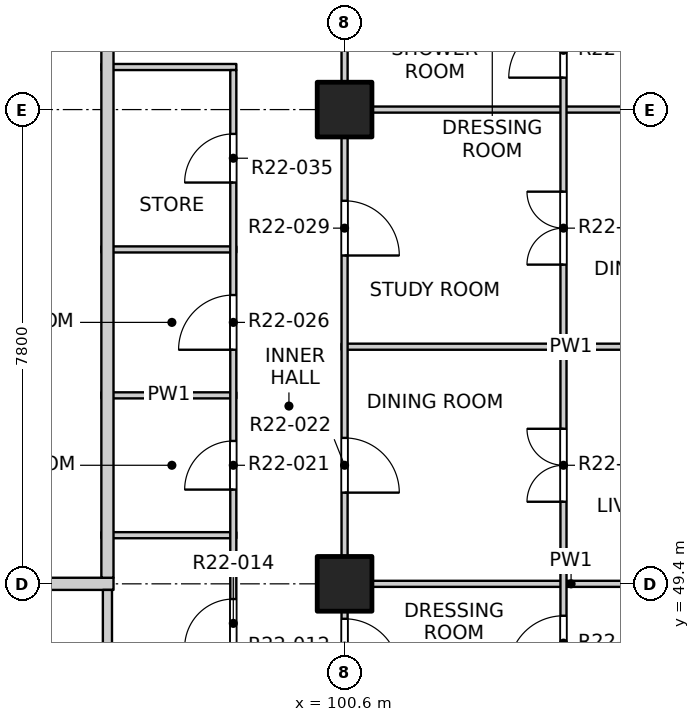
"""IFC4 building model, lengths in metres.
Left out: names, types, materials, properties, quantities, classifications, styles, units other than length and angle.
Written with IfcOpenShell. Run it as: python <this file> out.ifc"""

import sys

from ifc_helpers import new_model, si_unit, direction, frame, frame_2d, origin, origin_2d, place, context, subcontext, project, spatial, rectangle, extrude, element, fill, save


model = new_model("IFC4")
c1 = context("Model", 3, precision=1e-05, world=origin(), true_north=direction((0.0, 1.0)))
c2 = subcontext(c1, "Body", "Model", "MODEL_VIEW")
j1 = project(units=[si_unit("LENGTHUNIT", "METRE"), si_unit("PLANEANGLEUNIT", "RADIAN")], contexts=[c1])
p1 = place(None, origin())
s1 = spatial("IfcSite", under=j1, at=p1, CompositionType="ELEMENT")
p2 = place(p1, origin())
s2 = spatial("IfcBuilding", under=s1, at=p2, CompositionType="ELEMENT")
p3 = place(p2, frame((0.0, 0.0, 231.3)))
s3 = spatial("IfcBuildingStorey", under=s2, at=p3, CompositionType="ELEMENT", Elevation=231.3)
for number, where, z_axis, x_axis in (
    (1, (100.6, 49.4, -0.25), (0.0, 0.0, 1.0), (1.0, 0.0, 0.0)),
    (2, (100.6, 57.2, -0.25), (0.0, 0.0, 1.0), (1.0, 0.0, 0.0)),
):
    element("IfcColumn", number, at=place(p3, frame(where, z_axis=z_axis, x_axis=x_axis)), inside=s3, PredefinedType="COLUMN", context=c2, shape_type="SweptSolid", body=[
        extrude(rectangle(XDim=0.9, YDim=0.9, at=origin_2d()), origin(), (0.0, 0.0, 1.0), 3.4),
    ])
p4 = place(p3, frame((73.2, 49.4, 0.0), z_axis=(0.0, 0.0, 1.0), x_axis=(1.0, 0.0, 0.0)))
e3 = element("IfcWall", 3, at=p4, inside=s3, PredefinedType="PARTITIONING", context=c2, shape_type="SweptSolid", body=[
    extrude(rectangle(XDim=23.6, YDim=0.2, at=frame_2d((11.8, 0.0))), origin(), (0.0, 0.0, 1.0), 3.15),
])
p5 = place(p4, frame((5.35, 0.0, 0.0)))
e4 = element("IfcOpeningElement", 4, at=p5, cuts=e3, PredefinedType="OPENING", context=c2, shape_type="SweptSolid", body=[
    extrude(rectangle(XDim=1.2, YDim=2.1, at=frame_2d((0.6, 1.05))), frame((0.0, 0.11, 0.0), z_axis=(0.0, -1.0, 0.0), x_axis=(1.0, 0.0, 0.0)), (0.0, 0.0, 1.0), 0.22),
])
p6 = place(p4, frame((15.1, 0.0, 0.0)))
e5 = element("IfcOpeningElement", 5, at=p6, cuts=e3, PredefinedType="OPENING", context=c2, shape_type="SweptSolid", body=[
    extrude(rectangle(XDim=1.2, YDim=2.1, at=frame_2d((0.6, 1.05))), frame((0.0, 0.11, 0.0), z_axis=(0.0, -1.0, 0.0), x_axis=(1.0, 0.0, 0.0)), (0.0, 0.0, 1.0), 0.22),
])
p7 = place(p4, frame((21.1, 0.0, 0.0)))
e6 = element("IfcOpeningElement", 6, at=p7, cuts=e3, PredefinedType="OPENING", context=c2, shape_type="SweptSolid", body=[
    extrude(rectangle(XDim=0.9, YDim=2.1, at=frame_2d((0.45, 1.05))), frame((0.0, 0.11, 0.0), z_axis=(0.0, -1.0, 0.0), x_axis=(1.0, 0.0, 0.0)), (0.0, 0.0, 1.0), 0.22),
])
p8 = place(p3, frame((100.55, 49.4, 0.0), z_axis=(0.0, 0.0, 1.0), x_axis=(1.0, 0.0, 0.0)))
e7 = element("IfcWall", 7, at=p8, inside=s3, PredefinedType="PARTITIONING", context=c2, shape_type="SweptSolid", body=[
    extrude(rectangle(XDim=7.55, YDim=0.1, at=frame_2d((3.775, 0.0))), origin(), (0.0, 0.0, 1.0), 3.15),
])
for number, where, z_axis, x_axis in (
    (8, (96.6, 50.2, 0.0), (0.0, 0.0, 1.0), (1.0, 0.0, 0.0)),
    (9, (96.6, 52.5, 0.0), (0.0, 0.0, 1.0), (1.0, 0.0, 0.0)),
):
    element("IfcWall", number, at=place(p3, frame(where, z_axis=z_axis, x_axis=x_axis)), inside=s3, PredefinedType="PARTITIONING", context=c2, shape_type="SweptSolid", body=[
        extrude(rectangle(XDim=2.22, YDim=0.1, at=frame_2d((1.11, 0.0))), origin(), (0.0, 0.0, 1.0), 3.15),
    ])
p9 = place(p3, frame((100.55, 53.3, 0.0), z_axis=(0.0, 0.0, 1.0), x_axis=(1.0, 0.0, 0.0)))
e10 = element("IfcWall", 10, at=p9, inside=s3, PredefinedType="PARTITIONING", context=c2, shape_type="SweptSolid", body=[
    extrude(rectangle(XDim=7.55, YDim=0.1, at=frame_2d((3.775, 0.0))), origin(), (0.0, 0.0, 1.0), 3.15),
])
p10 = place(p3, frame((96.6, 54.9, 0.0), z_axis=(0.0, 0.0, 1.0), x_axis=(1.0, 0.0, 0.0)))
e11 = element("IfcWall", 11, at=p10, inside=s3, PredefinedType="PARTITIONING", context=c2, shape_type="SweptSolid", body=[
    extrude(rectangle(XDim=2.22, YDim=0.1, at=frame_2d((1.11, 0.0))), origin(), (0.0, 0.0, 1.0), 3.15),
])
p11 = place(p3, frame((100.55, 57.2, 0.0), z_axis=(0.0, 0.0, 1.0), x_axis=(1.0, 0.0, 0.0)))
e12 = element("IfcWall", 12, at=p11, inside=s3, PredefinedType="PARTITIONING", context=c2, shape_type="SweptSolid", body=[
    extrude(rectangle(XDim=7.55, YDim=0.1, at=frame_2d((3.775, 0.0))), origin(), (0.0, 0.0, 1.0), 3.15),
])
p12 = place(p3, frame((96.6, 57.9, 0.0), z_axis=(0.0, 0.0, 1.0), x_axis=(1.0, 0.0, 0.0)))
e13 = element("IfcWall", 13, at=p12, inside=s3, PredefinedType="PARTITIONING", context=c2, shape_type="SweptSolid", body=[
    extrude(rectangle(XDim=2.22, YDim=0.1, at=frame_2d((1.11, 0.0))), origin(), (0.0, 0.0, 1.0), 3.15),
])
p13 = place(p3, frame((96.7, 41.9, 0.0), z_axis=(0.0, 0.0, 1.0), x_axis=(0.0, 1.0, 0.0)))
e14 = element("IfcWall", 14, at=p13, inside=s3, PredefinedType="PARTITIONING", context=c2, shape_type="SweptSolid", body=[
    extrude(rectangle(XDim=7.4, YDim=0.15, at=frame_2d((3.7, 0.0))), origin(), (0.0, 0.0, 1.0), 3.15),
])
p14 = place(p3, frame((96.7, 49.5, 0.0), z_axis=(0.0, 0.0, 1.0), x_axis=(0.0, 1.0, 0.0)))
e15 = element("IfcWall", 15, at=p14, inside=s3, PredefinedType="PARTITIONING", context=c2, shape_type="SweptSolid", body=[
    extrude(rectangle(XDim=34.9, YDim=0.2, at=frame_2d((17.45, 0.0))), origin(), (0.0, 0.0, 1.0), 3.15),
])
p15 = place(p14, frame((9.675, 0.0, 0.0)))
e16 = element("IfcOpeningElement", 16, at=p15, cuts=e15, PredefinedType="OPENING", context=c2, shape_type="SweptSolid", body=[
    extrude(rectangle(XDim=1.0, YDim=2.1, at=frame_2d((0.5, 1.05))), frame((0.0, 0.11, 0.0), z_axis=(0.0, -1.0, 0.0), x_axis=(1.0, 0.0, 0.0)), (0.0, 0.0, 1.0), 0.22),
])
p16 = place(p14, frame((22.925, 0.0, 0.0)))
e17 = element("IfcOpeningElement", 17, at=p16, cuts=e15, PredefinedType="OPENING", context=c2, shape_type="SweptSolid", body=[
    extrude(rectangle(XDim=1.0, YDim=2.1, at=frame_2d((0.5, 1.05))), frame((0.0, 0.11, 0.0), z_axis=(0.0, -1.0, 0.0), x_axis=(1.0, 0.0, 0.0)), (0.0, 0.0, 1.0), 0.22),
])
p17 = place(p14, frame((33.025, 0.0, 0.0)))
e18 = element("IfcOpeningElement", 18, at=p17, cuts=e15, PredefinedType="OPENING", context=c2, shape_type="SweptSolid", body=[
    extrude(rectangle(XDim=1.0, YDim=2.1, at=frame_2d((0.5, 1.05))), frame((0.0, 0.11, 0.0), z_axis=(0.0, -1.0, 0.0), x_axis=(1.0, 0.0, 0.0)), (0.0, 0.0, 1.0), 0.22),
])
p18 = place(p3, frame((98.77, 45.55, 0.0), z_axis=(0.0, 0.0, 1.0), x_axis=(0.0, 1.0, 0.0)))
e19 = element("IfcWall", 19, at=p18, inside=s3, PredefinedType="PARTITIONING", context=c2, shape_type="SweptSolid", body=[
    extrude(rectangle(XDim=12.3, YDim=0.1, at=frame_2d((6.15, 0.0))), origin(), (0.0, 0.0, 1.0), 3.15),
])
p19 = place(p18, frame((0.4, 0.0, 0.0)))
e20 = element("IfcOpeningElement", 20, at=p19, cuts=e19, PredefinedType="OPENING", context=c2, shape_type="SweptSolid", body=[
    extrude(rectangle(XDim=0.9, YDim=2.1, at=frame_2d((0.45, 1.05))), frame((0.0, 0.06, 0.0), z_axis=(0.0, -1.0, 0.0), x_axis=(1.0, 0.0, 0.0)), (0.0, 0.0, 1.0), 0.12),
])
p20 = place(p18, frame((2.8, 0.0, 0.0)))
e21 = element("IfcOpeningElement", 21, at=p20, cuts=e19, PredefinedType="OPENING", context=c2, shape_type="SweptSolid", body=[
    extrude(rectangle(XDim=0.8, YDim=2.1, at=frame_2d((0.4, 1.05))), frame((0.0, 0.06, 0.0), z_axis=(0.0, -1.0, 0.0), x_axis=(1.0, 0.0, 0.0)), (0.0, 0.0, 1.0), 0.12),
])
p21 = place(p18, frame((5.4, 0.0, 0.0)))
e22 = element("IfcOpeningElement", 22, at=p21, cuts=e19, PredefinedType="OPENING", context=c2, shape_type="SweptSolid", body=[
    extrude(rectangle(XDim=0.8, YDim=2.1, at=frame_2d((0.4, 1.05))), frame((0.0, 0.06, 0.0), z_axis=(0.0, -1.0, 0.0), x_axis=(1.0, 0.0, 0.0)), (0.0, 0.0, 1.0), 0.12),
])
p22 = place(p18, frame((7.7, 0.0, 0.0)))
e23 = element("IfcOpeningElement", 23, at=p22, cuts=e19, PredefinedType="OPENING", context=c2, shape_type="SweptSolid", body=[
    extrude(rectangle(XDim=0.9, YDim=2.1, at=frame_2d((0.45, 1.05))), frame((0.0, 0.06, 0.0), z_axis=(0.0, -1.0, 0.0), x_axis=(1.0, 0.0, 0.0)), (0.0, 0.0, 1.0), 0.12),
])
p23 = place(p18, frame((10.45, 0.0, 0.0)))
e24 = element("IfcOpeningElement", 24, at=p23, cuts=e19, PredefinedType="OPENING", context=c2, shape_type="SweptSolid", body=[
    extrude(rectangle(XDim=0.8, YDim=2.1, at=frame_2d((0.4, 1.05))), frame((0.0, 0.06, 0.0), z_axis=(0.0, -1.0, 0.0), x_axis=(1.0, 0.0, 0.0)), (0.0, 0.0, 1.0), 0.12),
])
p24 = place(p3, frame((100.6, 41.9, 0.0), z_axis=(0.0, 0.0, 1.0), x_axis=(0.0, 1.0, 0.0)))
e25 = element("IfcWall", 25, at=p24, inside=s3, PredefinedType="PARTITIONING", context=c2, shape_type="SweptSolid", body=[
    extrude(rectangle(XDim=46.2, YDim=0.1, at=frame_2d((23.1, 0.0))), origin(), (0.0, 0.0, 1.0), 3.15),
])
p25 = place(p24, frame((1.2, 0.0, 0.0)))
e26 = element("IfcOpeningElement", 26, at=p25, cuts=e25, PredefinedType="OPENING", context=c2, shape_type="SweptSolid", body=[
    extrude(rectangle(XDim=0.9, YDim=2.1, at=frame_2d((0.45, 1.05))), frame((0.0, 0.06, 0.0), z_axis=(0.0, -1.0, 0.0), x_axis=(1.0, 0.0, 0.0)), (0.0, 0.0, 1.0), 0.12),
])
p26 = place(p24, frame((6.025, 0.0, 0.0)))
e27 = element("IfcOpeningElement", 27, at=p26, cuts=e25, PredefinedType="OPENING", context=c2, shape_type="SweptSolid", body=[
    extrude(rectangle(XDim=0.9, YDim=2.1, at=frame_2d((0.45, 1.05))), frame((0.0, 0.06, 0.0), z_axis=(0.0, -1.0, 0.0), x_axis=(1.0, 0.0, 0.0)), (0.0, 0.0, 1.0), 0.12),
])
p27 = place(p24, frame((9.0, 0.0, 0.0)))
e28 = element("IfcOpeningElement", 28, at=p27, cuts=e25, PredefinedType="OPENING", context=c2, shape_type="SweptSolid", body=[
    extrude(rectangle(XDim=0.9, YDim=2.1, at=frame_2d((0.45, 1.05))), frame((0.0, 0.06, 0.0), z_axis=(0.0, -1.0, 0.0), x_axis=(1.0, 0.0, 0.0)), (0.0, 0.0, 1.0), 0.12),
])
p28 = place(p24, frame((12.9, 0.0, 0.0)))
e29 = element("IfcOpeningElement", 29, at=p28, cuts=e25, PredefinedType="OPENING", context=c2, shape_type="SweptSolid", body=[
    extrude(rectangle(XDim=0.9, YDim=2.1, at=frame_2d((0.45, 1.05))), frame((0.0, 0.06, 0.0), z_axis=(0.0, -1.0, 0.0), x_axis=(1.0, 0.0, 0.0)), (0.0, 0.0, 1.0), 0.12),
])
p29 = place(p24, frame((17.775, 0.0, 0.0)))
e30 = element("IfcOpeningElement", 30, at=p29, cuts=e25, PredefinedType="OPENING", context=c2, shape_type="SweptSolid", body=[
    extrude(rectangle(XDim=0.9, YDim=2.1, at=frame_2d((0.45, 1.05))), frame((0.0, 0.06, 0.0), z_axis=(0.0, -1.0, 0.0), x_axis=(1.0, 0.0, 0.0)), (0.0, 0.0, 1.0), 0.12),
])
p30 = place(p24, frame((21.625, 0.0, 0.0)))
e31 = element("IfcOpeningElement", 31, at=p30, cuts=e25, PredefinedType="OPENING", context=c2, shape_type="SweptSolid", body=[
    extrude(rectangle(XDim=0.9, YDim=2.1, at=frame_2d((0.45, 1.05))), frame((0.0, 0.06, 0.0), z_axis=(0.0, -1.0, 0.0), x_axis=(1.0, 0.0, 0.0)), (0.0, 0.0, 1.0), 0.12),
])
p31 = place(p24, frame((25.575, 0.0, 0.0)))
e32 = element("IfcOpeningElement", 32, at=p31, cuts=e25, PredefinedType="OPENING", context=c2, shape_type="SweptSolid", body=[
    extrude(rectangle(XDim=0.9, YDim=2.1, at=frame_2d((0.45, 1.05))), frame((0.0, 0.06, 0.0), z_axis=(0.0, -1.0, 0.0), x_axis=(1.0, 0.0, 0.0)), (0.0, 0.0, 1.0), 0.12),
])
p32 = place(p24, frame((28.5, 0.0, 0.0)))
e33 = element("IfcOpeningElement", 33, at=p32, cuts=e25, PredefinedType="OPENING", context=c2, shape_type="SweptSolid", body=[
    extrude(rectangle(XDim=0.9, YDim=2.1, at=frame_2d((0.45, 1.05))), frame((0.0, 0.06, 0.0), z_axis=(0.0, -1.0, 0.0), x_axis=(1.0, 0.0, 0.0)), (0.0, 0.0, 1.0), 0.12),
])
p33 = place(p24, frame((33.375, 0.0, 0.0)))
e34 = element("IfcOpeningElement", 34, at=p33, cuts=e25, PredefinedType="OPENING", context=c2, shape_type="SweptSolid", body=[
    extrude(rectangle(XDim=0.9, YDim=2.1, at=frame_2d((0.45, 1.05))), frame((0.0, 0.06, 0.0), z_axis=(0.0, -1.0, 0.0), x_axis=(1.0, 0.0, 0.0)), (0.0, 0.0, 1.0), 0.12),
])
p34 = place(p24, frame((36.3, 0.0, 0.0)))
e35 = element("IfcOpeningElement", 35, at=p34, cuts=e25, PredefinedType="OPENING", context=c2, shape_type="SweptSolid", body=[
    extrude(rectangle(XDim=0.9, YDim=2.1, at=frame_2d((0.45, 1.05))), frame((0.0, 0.06, 0.0), z_axis=(0.0, -1.0, 0.0), x_axis=(1.0, 0.0, 0.0)), (0.0, 0.0, 1.0), 0.12),
])
p35 = place(p24, frame((40.2, 0.0, 0.0)))
e36 = element("IfcOpeningElement", 36, at=p35, cuts=e25, PredefinedType="OPENING", context=c2, shape_type="SweptSolid", body=[
    extrude(rectangle(XDim=0.9, YDim=2.1, at=frame_2d((0.45, 1.05))), frame((0.0, 0.06, 0.0), z_axis=(0.0, -1.0, 0.0), x_axis=(1.0, 0.0, 0.0)), (0.0, 0.0, 1.0), 0.12),
])
p36 = place(p24, frame((44.1, 0.0, 0.0)))
e37 = element("IfcOpeningElement", 37, at=p36, cuts=e25, PredefinedType="OPENING", context=c2, shape_type="SweptSolid", body=[
    extrude(rectangle(XDim=0.9, YDim=2.1, at=frame_2d((0.45, 1.05))), frame((0.0, 0.06, 0.0), z_axis=(0.0, -1.0, 0.0), x_axis=(1.0, 0.0, 0.0)), (0.0, 0.0, 1.0), 0.12),
])
p37 = place(p3, frame((104.2, 41.9, 0.0), z_axis=(0.0, 0.0, 1.0), x_axis=(0.0, 1.0, 0.0)))
e38 = element("IfcWall", 38, at=p37, inside=s3, PredefinedType="PARTITIONING", context=c2, shape_type="SweptSolid", body=[
    extrude(rectangle(XDim=34.7, YDim=0.1, at=frame_2d((17.35, 0.0))), origin(), (0.0, 0.0, 1.0), 3.15),
])
p38 = place(p37, frame((1.05, 0.0, 0.0)))
e39 = element("IfcOpeningElement", 39, at=p38, cuts=e38, PredefinedType="OPENING", context=c2, shape_type="SweptSolid", body=[
    extrude(rectangle(XDim=1.2, YDim=2.1, at=frame_2d((0.6, 1.05))), frame((0.0, 0.06, 0.0), z_axis=(0.0, -1.0, 0.0), x_axis=(1.0, 0.0, 0.0)), (0.0, 0.0, 1.0), 0.12),
])
p39 = place(p37, frame((4.125, 0.0, 0.0)))
e40 = element("IfcOpeningElement", 40, at=p39, cuts=e38, PredefinedType="OPENING", context=c2, shape_type="SweptSolid", body=[
    extrude(rectangle(XDim=0.9, YDim=2.1, at=frame_2d((0.45, 1.05))), frame((0.0, 0.06, 0.0), z_axis=(0.0, -1.0, 0.0), x_axis=(1.0, 0.0, 0.0)), (0.0, 0.0, 1.0), 0.12),
])
p40 = place(p37, frame((6.075, 0.0, 0.0)))
e41 = element("IfcOpeningElement", 41, at=p40, cuts=e38, PredefinedType="OPENING", context=c2, shape_type="SweptSolid", body=[
    extrude(rectangle(XDim=0.9, YDim=2.1, at=frame_2d((0.45, 1.05))), frame((0.0, 0.06, 0.0), z_axis=(0.0, -1.0, 0.0), x_axis=(1.0, 0.0, 0.0)), (0.0, 0.0, 1.0), 0.12),
])
p41 = place(p37, frame((8.85, 0.0, 0.0)))
e42 = element("IfcOpeningElement", 42, at=p41, cuts=e38, PredefinedType="OPENING", context=c2, shape_type="SweptSolid", body=[
    extrude(rectangle(XDim=1.2, YDim=2.1, at=frame_2d((0.6, 1.05))), frame((0.0, 0.06, 0.0), z_axis=(0.0, -1.0, 0.0), x_axis=(1.0, 0.0, 0.0)), (0.0, 0.0, 1.0), 0.12),
])
p42 = place(p37, frame((12.75, 0.0, 0.0)))
e43 = element("IfcOpeningElement", 43, at=p42, cuts=e38, PredefinedType="OPENING", context=c2, shape_type="SweptSolid", body=[
    extrude(rectangle(XDim=1.2, YDim=2.1, at=frame_2d((0.6, 1.05))), frame((0.0, 0.06, 0.0), z_axis=(0.0, -1.0, 0.0), x_axis=(1.0, 0.0, 0.0)), (0.0, 0.0, 1.0), 0.12),
])
p43 = place(p37, frame((15.825, 0.0, 0.0)))
e44 = element("IfcOpeningElement", 44, at=p43, cuts=e38, PredefinedType="OPENING", context=c2, shape_type="SweptSolid", body=[
    extrude(rectangle(XDim=0.9, YDim=2.1, at=frame_2d((0.45, 1.05))), frame((0.0, 0.06, 0.0), z_axis=(0.0, -1.0, 0.0), x_axis=(1.0, 0.0, 0.0)), (0.0, 0.0, 1.0), 0.12),
])
p44 = place(p37, frame((17.775, 0.0, 0.0)))
e45 = element("IfcOpeningElement", 45, at=p44, cuts=e38, PredefinedType="OPENING", context=c2, shape_type="SweptSolid", body=[
    extrude(rectangle(XDim=0.9, YDim=2.1, at=frame_2d((0.45, 1.05))), frame((0.0, 0.06, 0.0), z_axis=(0.0, -1.0, 0.0), x_axis=(1.0, 0.0, 0.0)), (0.0, 0.0, 1.0), 0.12),
])
p45 = place(p37, frame((19.725, 0.0, 0.0)))
e46 = element("IfcOpeningElement", 46, at=p45, cuts=e38, PredefinedType="OPENING", context=c2, shape_type="SweptSolid", body=[
    extrude(rectangle(XDim=0.9, YDim=2.1, at=frame_2d((0.45, 1.05))), frame((0.0, 0.06, 0.0), z_axis=(0.0, -1.0, 0.0), x_axis=(1.0, 0.0, 0.0)), (0.0, 0.0, 1.0), 0.12),
])
p46 = place(p37, frame((21.675, 0.0, 0.0)))
e47 = element("IfcOpeningElement", 47, at=p46, cuts=e38, PredefinedType="OPENING", context=c2, shape_type="SweptSolid", body=[
    extrude(rectangle(XDim=0.9, YDim=2.1, at=frame_2d((0.45, 1.05))), frame((0.0, 0.06, 0.0), z_axis=(0.0, -1.0, 0.0), x_axis=(1.0, 0.0, 0.0)), (0.0, 0.0, 1.0), 0.12),
])
p47 = place(p37, frame((23.625, 0.0, 0.0)))
e48 = element("IfcOpeningElement", 48, at=p47, cuts=e38, PredefinedType="OPENING", context=c2, shape_type="SweptSolid", body=[
    extrude(rectangle(XDim=0.9, YDim=2.1, at=frame_2d((0.45, 1.05))), frame((0.0, 0.06, 0.0), z_axis=(0.0, -1.0, 0.0), x_axis=(1.0, 0.0, 0.0)), (0.0, 0.0, 1.0), 0.12),
])
p48 = place(p37, frame((25.575, 0.0, 0.0)))
e49 = element("IfcOpeningElement", 49, at=p48, cuts=e38, PredefinedType="OPENING", context=c2, shape_type="SweptSolid", body=[
    extrude(rectangle(XDim=0.9, YDim=2.1, at=frame_2d((0.45, 1.05))), frame((0.0, 0.06, 0.0), z_axis=(0.0, -1.0, 0.0), x_axis=(1.0, 0.0, 0.0)), (0.0, 0.0, 1.0), 0.12),
])
p49 = place(p37, frame((28.35, 0.0, 0.0)))
e50 = element("IfcOpeningElement", 50, at=p49, cuts=e38, PredefinedType="OPENING", context=c2, shape_type="SweptSolid", body=[
    extrude(rectangle(XDim=1.2, YDim=2.1, at=frame_2d((0.6, 1.05))), frame((0.0, 0.06, 0.0), z_axis=(0.0, -1.0, 0.0), x_axis=(1.0, 0.0, 0.0)), (0.0, 0.0, 1.0), 0.12),
])
p50 = place(p37, frame((31.425, 0.0, 0.0)))
e51 = element("IfcOpeningElement", 51, at=p50, cuts=e38, PredefinedType="OPENING", context=c2, shape_type="SweptSolid", body=[
    extrude(rectangle(XDim=0.9, YDim=2.1, at=frame_2d((0.45, 1.05))), frame((0.0, 0.06, 0.0), z_axis=(0.0, -1.0, 0.0), x_axis=(1.0, 0.0, 0.0)), (0.0, 0.0, 1.0), 0.12),
])
p51 = place(p37, frame((33.375, 0.0, 0.0)))
e52 = element("IfcOpeningElement", 52, at=p51, cuts=e38, PredefinedType="OPENING", context=c2, shape_type="SweptSolid", body=[
    extrude(rectangle(XDim=0.9, YDim=2.1, at=frame_2d((0.45, 1.05))), frame((0.0, 0.06, 0.0), z_axis=(0.0, -1.0, 0.0), x_axis=(1.0, 0.0, 0.0)), (0.0, 0.0, 1.0), 0.12),
])
p52 = place(p26, origin())
e53 = element("IfcDoor", 53, at=p52, inside=s3, OperationType="SINGLE_SWING_RIGHT", PredefinedType="DOOR", context=c2, shape_type="SweptSolid", body=[
    extrude(rectangle(XDim=0.9, YDim=2.1, at=frame_2d((0.45, 1.05))), frame((0.0, 0.025, 0.0), z_axis=(0.0, -1.0, 0.0), x_axis=(1.0, 0.0, 0.0)), (0.0, 0.0, 1.0), 0.05),
])
fill(e27, e53)
p53 = place(p40, origin())
e54 = element("IfcDoor", 54, at=p53, inside=s3, OperationType="SINGLE_SWING_LEFT", PredefinedType="DOOR", context=c2, shape_type="SweptSolid", body=[
    extrude(rectangle(XDim=0.9, YDim=2.1, at=frame_2d((0.45, 1.05))), frame((0.0, 0.025, 0.0), z_axis=(0.0, -1.0, 0.0), x_axis=(1.0, 0.0, 0.0)), (0.0, 0.0, 1.0), 0.05),
])
fill(e41, e54)
p54 = place(p20, origin())
e55 = element("IfcDoor", 55, at=p54, inside=s3, OperationType="SINGLE_SWING_LEFT", PredefinedType="DOOR", context=c2, shape_type="SweptSolid", body=[
    extrude(rectangle(XDim=0.8, YDim=2.1, at=frame_2d((0.4, 1.05))), frame((0.0, 0.025, 0.0), z_axis=(0.0, -1.0, 0.0), x_axis=(1.0, 0.0, 0.0)), (0.0, 0.0, 1.0), 0.05),
])
fill(e21, e55)
p55 = place(p21, origin())
e56 = element("IfcDoor", 56, at=p55, inside=s3, OperationType="SINGLE_SWING_LEFT", PredefinedType="DOOR", context=c2, shape_type="SweptSolid", body=[
    extrude(rectangle(XDim=0.8, YDim=2.1, at=frame_2d((0.4, 1.05))), frame((0.0, 0.025, 0.0), z_axis=(0.0, -1.0, 0.0), x_axis=(1.0, 0.0, 0.0)), (0.0, 0.0, 1.0), 0.05),
])
fill(e22, e56)
p56 = place(p27, origin())
e57 = element("IfcDoor", 57, at=p56, inside=s3, OperationType="SINGLE_SWING_RIGHT", PredefinedType="DOOR", context=c2, shape_type="SweptSolid", body=[
    extrude(rectangle(XDim=0.9, YDim=2.1, at=frame_2d((0.45, 1.05))), frame((0.0, 0.025, 0.0), z_axis=(0.0, -1.0, 0.0), x_axis=(1.0, 0.0, 0.0)), (0.0, 0.0, 1.0), 0.05),
])
fill(e28, e57)
p57 = place(p41, origin())
e58 = element("IfcDoor", 58, at=p57, inside=s3, OperationType="DOUBLE_DOOR_SINGLE_SWING", PredefinedType="DOOR", context=c2, shape_type="SweptSolid", body=[
    extrude(rectangle(XDim=1.2, YDim=2.1, at=frame_2d((0.6, 1.05))), frame((0.0, 0.025, 0.0), z_axis=(0.0, -1.0, 0.0), x_axis=(1.0, 0.0, 0.0)), (0.0, 0.0, 1.0), 0.05),
])
fill(e42, e58)
p58 = place(p22, origin())
e59 = element("IfcDoor", 59, at=p58, inside=s3, OperationType="SINGLE_SWING_LEFT", PredefinedType="DOOR", context=c2, shape_type="SweptSolid", body=[
    extrude(rectangle(XDim=0.9, YDim=2.1, at=frame_2d((0.45, 1.05))), frame((0.0, 0.025, 0.0), z_axis=(0.0, -1.0, 0.0), x_axis=(1.0, 0.0, 0.0)), (0.0, 0.0, 1.0), 0.05),
])
fill(e23, e59)
p59 = place(p28, origin())
e60 = element("IfcDoor", 60, at=p59, inside=s3, OperationType="SINGLE_SWING_RIGHT", PredefinedType="DOOR", context=c2, shape_type="SweptSolid", body=[
    extrude(rectangle(XDim=0.9, YDim=2.1, at=frame_2d((0.45, 1.05))), frame((0.0, 0.025, 0.0), z_axis=(0.0, -1.0, 0.0), x_axis=(1.0, 0.0, 0.0)), (0.0, 0.0, 1.0), 0.05),
])
fill(e29, e60)
p60 = place(p42, origin())
e61 = element("IfcDoor", 61, at=p60, inside=s3, OperationType="DOUBLE_DOOR_SINGLE_SWING", PredefinedType="DOOR", context=c2, shape_type="SweptSolid", body=[
    extrude(rectangle(XDim=1.2, YDim=2.1, at=frame_2d((0.6, 1.05))), frame((0.0, 0.025, 0.0), z_axis=(0.0, -1.0, 0.0), x_axis=(1.0, 0.0, 0.0)), (0.0, 0.0, 1.0), 0.05),
])
fill(e43, e61)
p61 = place(p23, origin())
e62 = element("IfcDoor", 62, at=p61, inside=s3, OperationType="SINGLE_SWING_LEFT", PredefinedType="DOOR", context=c2, shape_type="SweptSolid", body=[
    extrude(rectangle(XDim=0.8, YDim=2.1, at=frame_2d((0.4, 1.05))), frame((0.0, 0.025, 0.0), z_axis=(0.0, -1.0, 0.0), x_axis=(1.0, 0.0, 0.0)), (0.0, 0.0, 1.0), 0.05),
])
fill(e24, e62)
p62 = place(p43, origin())
e63 = element("IfcDoor", 63, at=p62, inside=s3, OperationType="SINGLE_SWING_LEFT", PredefinedType="DOOR", context=c2, shape_type="SweptSolid", body=[
    extrude(rectangle(XDim=0.9, YDim=2.1, at=frame_2d((0.45, 1.05))), frame((0.0, 0.025, 0.0), z_axis=(0.0, -1.0, 0.0), x_axis=(1.0, 0.0, 0.0)), (0.0, 0.0, 1.0), 0.05),
])
fill(e44, e63)
save(model, sys.argv[1])
